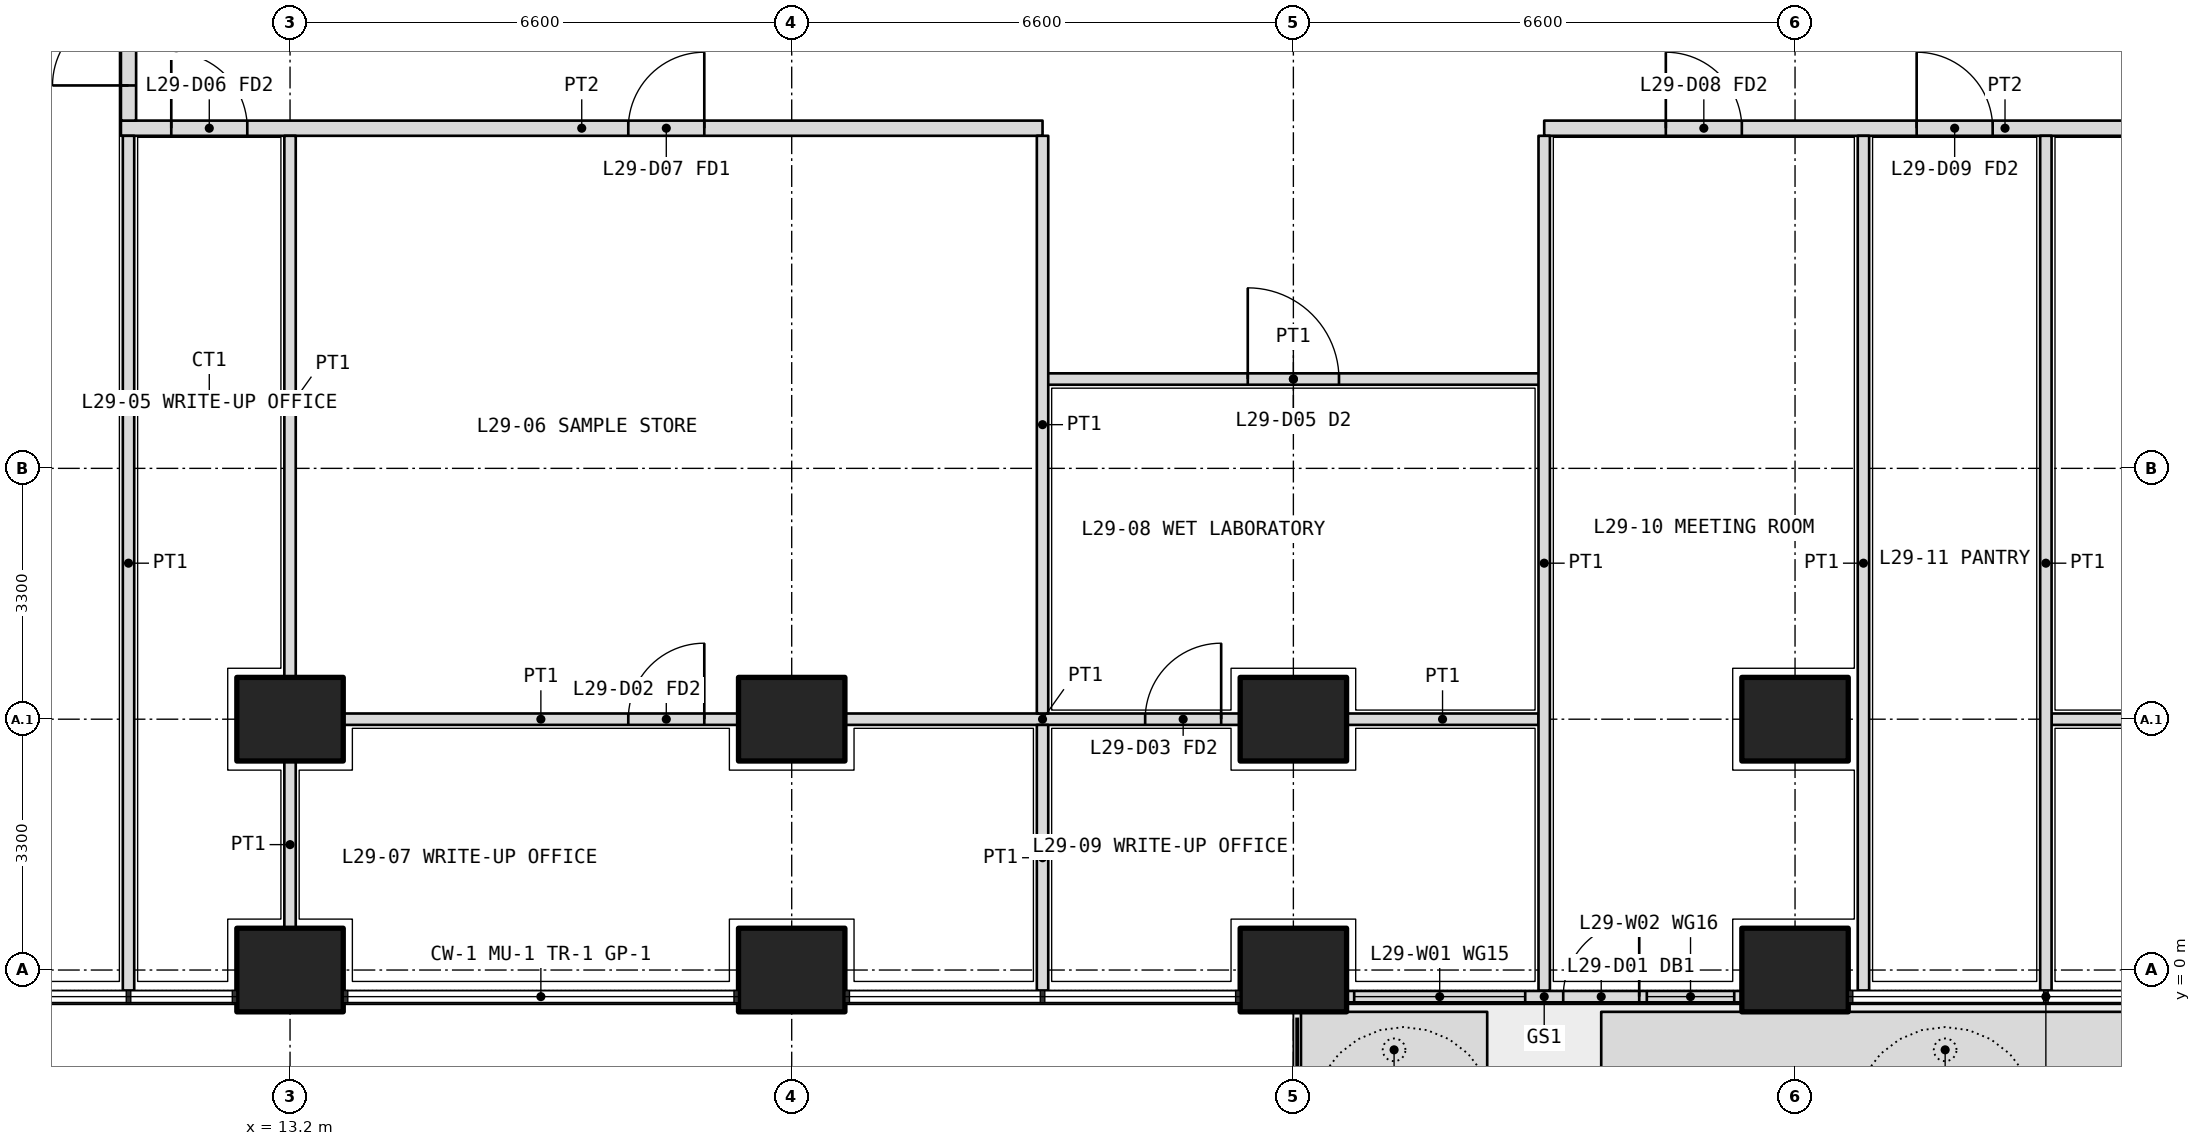
"""IFC4 building model, lengths in metres.
Left out: names, types, materials, properties, quantities, classifications, styles, units other than length and angle.
Written with IfcOpenShell. Run it as: python <this file> out.ifc"""

import sys

from ifc_helpers import new_model, si_unit, direction, frame, frame_2d, origin, origin_2d, place, context, subcontext, project, spatial, polyline, rectangle, outline, extrude, element, fill, save


model = new_model("IFC4")
c1 = context("Model", 3, precision=1e-05, world=origin(), true_north=direction((0.0, 1.0)))
c2 = subcontext(c1, "Body", "Model", "MODEL_VIEW")
j1 = project(units=[si_unit("LENGTHUNIT", "METRE"), si_unit("PLANEANGLEUNIT", "RADIAN")], contexts=[c1])
p1 = place(None, origin())
s1 = spatial("IfcSite", under=j1, at=p1, CompositionType="ELEMENT")
p2 = place(p1, origin())
s2 = spatial("IfcBuilding", under=s1, at=p2, CompositionType="ELEMENT")
p3 = place(p2, frame((0.0, 0.0, 128.4)))
s3 = spatial("IfcBuildingStorey", under=s2, at=p3, CompositionType="ELEMENT", Elevation=128.4)
for number, where, z_axis, x_axis in (
    (1, (13.2, 0.0, 0.0), (0.0, 0.0, 1.0), (1.0, 0.0, 0.0)),
    (2, (19.8, 0.0, 0.0), (0.0, 0.0, 1.0), (1.0, 0.0, 0.0)),
    (3, (26.4, 0.0, 0.0), (0.0, 0.0, 1.0), (1.0, 0.0, 0.0)),
    (4, (33.0, 0.0, 0.0), (0.0, 0.0, 1.0), (1.0, 0.0, 0.0)),
    (5, (13.2, 3.3, 0.0), (0.0, 0.0, 1.0), (1.0, 0.0, 0.0)),
    (6, (19.8, 3.3, 0.0), (0.0, 0.0, 1.0), (1.0, 0.0, 0.0)),
    (7, (26.4, 3.3, 0.0), (0.0, 0.0, 1.0), (1.0, 0.0, 0.0)),
    (8, (33.0, 3.3, 0.0), (0.0, 0.0, 1.0), (1.0, 0.0, 0.0)),
):
    element("IfcColumn", number, at=place(p3, frame(where, z_axis=z_axis, x_axis=x_axis)), inside=s3, PredefinedType="COLUMN", context=c2, shape_type="SweptSolid", body=[
        extrude(rectangle(XDim=1.4, YDim=1.1, at=origin_2d()), origin(), (0.0, 0.0, 1.0), 4.2),
    ])
p4 = place(p3, origin())
e9 = element("IfcWall", 9, at=p4, inside=s3, PredefinedType="USERDEFINED", context=c2, shape_type="SweptSolid", body=[
    extrude(outline(polyline([(26.5, -1.55), (28.95, -1.55), (28.95, -0.55), (26.5, -0.55), (26.5, -1.55)]), holes=[polyline([(26.65, -1.4), (28.8, -1.4), (28.8, -0.7), (26.65, -0.7), (26.65, -1.4)])]), origin(), (0.0, 0.0, 1.0), 1.05),
])
p5 = place(p3, origin())
e10 = element("IfcWall", 10, at=p5, inside=s3, PredefinedType="USERDEFINED", context=c2, shape_type="SweptSolid", body=[
    extrude(outline(polyline([(30.45, -1.55), (39.5, -1.55), (39.5, -0.55), (30.45, -0.55), (30.45, -1.55)]), holes=[polyline([(30.6, -1.4), (39.35, -1.4), (39.35, -0.7), (30.6, -0.7), (30.6, -1.4)])]), origin(), (0.0, 0.0, 1.0), 1.05),
])
p6 = place(p3, frame((27.1, -0.35, 0.0), z_axis=(0.0, 0.0, 1.0), x_axis=(1.0, 0.0, 0.0)))
e11 = element("IfcWall", 11, at=p6, inside=s3, PredefinedType="SOLIDWALL", context=c2, shape_type="SweptSolid", body=[
    extrude(rectangle(XDim=5.2, YDim=0.15, at=frame_2d((2.6, 0.0))), origin(), (0.0, 0.0, 1.0), 2.7),
])
p7 = place(p6, frame((2.85, 0.0, 0.0)))
e12 = element("IfcOpeningElement", 12, at=p7, cuts=e11, PredefinedType="OPENING", context=c2, shape_type="SweptSolid", body=[
    extrude(rectangle(XDim=1.0, YDim=2.4, at=frame_2d((0.5, 1.2))), frame((0.0, 0.085, 0.0), z_axis=(0.0, -1.0, 0.0), x_axis=(1.0, 0.0, 0.0)), (0.0, 0.0, 1.0), 0.17),
])
p8 = place(p6, frame((0.1, 0.0, 0.1)))
e13 = element("IfcOpeningElement", 13, at=p8, cuts=e11, PredefinedType="OPENING", context=c2, shape_type="SweptSolid", body=[
    extrude(rectangle(XDim=2.25, YDim=2.3, at=frame_2d((1.125, 1.15))), frame((0.0, 0.085, 0.0), z_axis=(0.0, -1.0, 0.0), x_axis=(1.0, 0.0, 0.0)), (0.0, 0.0, 1.0), 0.17),
])
p9 = place(p6, frame((3.95, 0.0, 0.1)))
e14 = element("IfcOpeningElement", 14, at=p9, cuts=e11, PredefinedType="OPENING", context=c2, shape_type="SweptSolid", body=[
    extrude(rectangle(XDim=1.15, YDim=2.3, at=frame_2d((0.575, 1.15))), frame((0.0, 0.085, 0.0), z_axis=(0.0, -1.0, 0.0), x_axis=(1.0, 0.0, 0.0)), (0.0, 0.0, 1.0), 0.17),
])
p10 = place(p3, frame((10.975, 11.075, 0.0), z_axis=(0.0, 0.0, 1.0), x_axis=(1.0, 0.0, 0.0)))
e15 = element("IfcWall", 15, at=p10, inside=s3, PredefinedType="PARTITIONING", context=c2, shape_type="SweptSolid", body=[
    extrude(rectangle(XDim=12.125, YDim=0.2, at=frame_2d((6.062, 0.0))), origin(), (0.0, 0.0, 1.0), 2.85),
])
p11 = place(p10, frame((0.663, 0.0, 0.0)))
e16 = element("IfcOpeningElement", 16, at=p11, cuts=e15, PredefinedType="OPENING", context=c2, shape_type="SweptSolid", body=[
    extrude(rectangle(XDim=1.0, YDim=2.1, at=frame_2d((0.5, 1.05))), frame((0.0, 0.11, 0.0), z_axis=(0.0, -1.0, 0.0), x_axis=(1.0, 0.0, 0.0)), (0.0, 0.0, 1.0), 0.22),
])
p12 = place(p10, frame((6.675, 0.0, 0.0)))
e17 = element("IfcOpeningElement", 17, at=p12, cuts=e15, PredefinedType="OPENING", context=c2, shape_type="SweptSolid", body=[
    extrude(rectangle(XDim=1.0, YDim=2.1, at=frame_2d((0.5, 1.05))), frame((0.0, 0.11, 0.0), z_axis=(0.0, -1.0, 0.0), x_axis=(1.0, 0.0, 0.0)), (0.0, 0.0, 1.0), 0.22),
])
p13 = place(p3, frame((29.7, 11.075, 0.0), z_axis=(0.0, 0.0, 1.0), x_axis=(1.0, 0.0, 0.0)))
e18 = element("IfcWall", 18, at=p13, inside=s3, PredefinedType="PARTITIONING", context=c2, shape_type="SweptSolid", body=[
    extrude(rectangle(XDim=12.125, YDim=0.2, at=frame_2d((6.062, 0.0))), origin(), (0.0, 0.0, 1.0), 2.85),
])
p14 = place(p13, frame((1.6, 0.0, 0.0)))
e19 = element("IfcOpeningElement", 19, at=p14, cuts=e18, PredefinedType="OPENING", context=c2, shape_type="SweptSolid", body=[
    extrude(rectangle(XDim=1.0, YDim=2.1, at=frame_2d((0.5, 1.05))), frame((0.0, 0.11, 0.0), z_axis=(0.0, -1.0, 0.0), x_axis=(1.0, 0.0, 0.0)), (0.0, 0.0, 1.0), 0.22),
])
p15 = place(p13, frame((4.9, 0.0, 0.0)))
e20 = element("IfcOpeningElement", 20, at=p15, cuts=e18, PredefinedType="OPENING", context=c2, shape_type="SweptSolid", body=[
    extrude(rectangle(XDim=1.0, YDim=2.1, at=frame_2d((0.5, 1.05))), frame((0.0, 0.11, 0.0), z_axis=(0.0, -1.0, 0.0), x_axis=(1.0, 0.0, 0.0)), (0.0, 0.0, 1.0), 0.22),
])
p16 = place(p13, frame((8.812, 0.0, 0.0)))
e21 = element("IfcOpeningElement", 21, at=p16, cuts=e18, PredefinedType="OPENING", context=c2, shape_type="SweptSolid", body=[
    extrude(rectangle(XDim=1.0, YDim=2.1, at=frame_2d((0.5, 1.05))), frame((0.0, 0.11, 0.0), z_axis=(0.0, -1.0, 0.0), x_axis=(1.0, 0.0, 0.0)), (0.0, 0.0, 1.0), 0.22),
])
p17 = place(p3, frame((11.075, 11.175, 0.0), z_axis=(0.0, 0.0, 1.0), x_axis=(0.0, 1.0, 0.0)))
e22 = element("IfcWall", 22, at=p17, inside=s3, PredefinedType="PARTITIONING", context=c2, shape_type="SweptSolid", body=[
    extrude(rectangle(XDim=27.625, YDim=0.2, at=frame_2d((13.812, 0.0))), origin(), (0.0, 0.0, 1.0), 2.85),
])
p18 = place(p17, frame((0.462, 0.0, 0.0)))
e23 = element("IfcOpeningElement", 23, at=p18, cuts=e22, PredefinedType="OPENING", context=c2, shape_type="SweptSolid", body=[
    extrude(rectangle(XDim=1.0, YDim=2.1, at=frame_2d((0.5, 1.05))), frame((0.0, 0.11, 0.0), z_axis=(0.0, -1.0, 0.0), x_axis=(1.0, 0.0, 0.0)), (0.0, 0.0, 1.0), 0.22),
])
p19 = place(p17, frame((2.575, 0.0, 0.0)))
e24 = element("IfcOpeningElement", 24, at=p19, cuts=e22, PredefinedType="OPENING", context=c2, shape_type="SweptSolid", body=[
    extrude(rectangle(XDim=1.0, YDim=2.1, at=frame_2d((0.5, 1.05))), frame((0.0, 0.11, 0.0), z_axis=(0.0, -1.0, 0.0), x_axis=(1.0, 0.0, 0.0)), (0.0, 0.0, 1.0), 0.22),
])
p20 = place(p17, frame((5.65, 0.0, 0.0)))
e25 = element("IfcOpeningElement", 25, at=p20, cuts=e22, PredefinedType="OPENING", context=c2, shape_type="SweptSolid", body=[
    extrude(rectangle(XDim=0.9, YDim=2.1, at=frame_2d((0.45, 1.05))), frame((0.0, 0.11, 0.0), z_axis=(0.0, -1.0, 0.0), x_axis=(1.0, 0.0, 0.0)), (0.0, 0.0, 1.0), 0.22),
])
p21 = place(p17, frame((9.5, 0.0, 0.0)))
e26 = element("IfcOpeningElement", 26, at=p21, cuts=e22, PredefinedType="OPENING", context=c2, shape_type="SweptSolid", body=[
    extrude(rectangle(XDim=0.9, YDim=2.1, at=frame_2d((0.45, 1.05))), frame((0.0, 0.11, 0.0), z_axis=(0.0, -1.0, 0.0), x_axis=(1.0, 0.0, 0.0)), (0.0, 0.0, 1.0), 0.22),
])
p22 = place(p17, frame((13.025, 0.0, 0.0)))
e27 = element("IfcOpeningElement", 27, at=p22, cuts=e22, PredefinedType="OPENING", context=c2, shape_type="SweptSolid", body=[
    extrude(rectangle(XDim=1.0, YDim=2.1, at=frame_2d((0.5, 1.05))), frame((0.0, 0.11, 0.0), z_axis=(0.0, -1.0, 0.0), x_axis=(1.0, 0.0, 0.0)), (0.0, 0.0, 1.0), 0.22),
])
p23 = place(p17, frame((19.675, 0.0, 0.0)))
e28 = element("IfcOpeningElement", 28, at=p23, cuts=e22, PredefinedType="OPENING", context=c2, shape_type="SweptSolid", body=[
    extrude(rectangle(XDim=1.0, YDim=2.1, at=frame_2d((0.5, 1.05))), frame((0.0, 0.11, 0.0), z_axis=(0.0, -1.0, 0.0), x_axis=(1.0, 0.0, 0.0)), (0.0, 0.0, 1.0), 0.22),
])
p24 = place(p17, frame((25.925, 0.0, 0.0)))
e29 = element("IfcOpeningElement", 29, at=p24, cuts=e22, PredefinedType="OPENING", context=c2, shape_type="SweptSolid", body=[
    extrude(rectangle(XDim=1.0, YDim=2.1, at=frame_2d((0.5, 1.05))), frame((0.0, 0.11, 0.0), z_axis=(0.0, -1.0, 0.0), x_axis=(1.0, 0.0, 0.0)), (0.0, 0.0, 1.0), 0.22),
])
p25 = place(p3, frame((11.075, -0.27, 0.0), z_axis=(0.0, 0.0, 1.0), x_axis=(0.0, 1.0, 0.0)))
e30 = element("IfcWall", 30, at=p25, inside=s3, PredefinedType="PARTITIONING", context=c2, shape_type="SweptSolid", body=[
    extrude(rectangle(XDim=11.245, YDim=0.15, at=frame_2d((5.623, 0.0))), origin(), (0.0, 0.0, 1.0), 2.7),
])
p26 = place(p3, frame((13.9, 3.3, 0.0), z_axis=(0.0, 0.0, 1.0), x_axis=(1.0, 0.0, 0.0)))
e31 = element("IfcWall", 31, at=p26, inside=s3, PredefinedType="PARTITIONING", context=c2, shape_type="SweptSolid", body=[
    extrude(rectangle(XDim=5.2, YDim=0.15, at=frame_2d((2.6, 0.0))), origin(), (0.0, 0.0, 1.0), 2.85),
])
p27 = place(p26, frame((3.75, 0.0, 0.0)))
e32 = element("IfcOpeningElement", 32, at=p27, cuts=e31, PredefinedType="OPENING", context=c2, shape_type="SweptSolid", body=[
    extrude(rectangle(XDim=1.0, YDim=2.1, at=frame_2d((0.5, 1.05))), frame((0.0, 0.085, 0.0), z_axis=(0.0, -1.0, 0.0), x_axis=(1.0, 0.0, 0.0)), (0.0, 0.0, 1.0), 0.17),
])
p28 = place(p3, frame((20.5, 3.3, 0.0), z_axis=(0.0, 0.0, 1.0), x_axis=(1.0, 0.0, 0.0)))
e33 = element("IfcWall", 33, at=p28, inside=s3, PredefinedType="PARTITIONING", context=c2, shape_type="SweptSolid", body=[
    extrude(rectangle(XDim=5.2, YDim=0.15, at=frame_2d((2.6, 0.0))), origin(), (0.0, 0.0, 1.0), 2.85),
])
p29 = place(p28, frame((3.95, 0.0, 0.0)))
e34 = element("IfcOpeningElement", 34, at=p29, cuts=e33, PredefinedType="OPENING", context=c2, shape_type="SweptSolid", body=[
    extrude(rectangle(XDim=1.0, YDim=2.1, at=frame_2d((0.5, 1.05))), frame((0.0, 0.085, 0.0), z_axis=(0.0, -1.0, 0.0), x_axis=(1.0, 0.0, 0.0)), (0.0, 0.0, 1.0), 0.17),
])
for number, where, z_axis, x_axis in (
    (35, (27.1, 3.3, 0.0), (0.0, 0.0, 1.0), (1.0, 0.0, 0.0)),
    (36, (36.375, 3.3, 0.0), (0.0, 0.0, 1.0), (1.0, 0.0, 0.0)),
):
    element("IfcWall", number, at=place(p3, frame(where, z_axis=z_axis, x_axis=x_axis)), inside=s3, PredefinedType="PARTITIONING", context=c2, shape_type="SweptSolid", body=[
        extrude(rectangle(XDim=2.525, YDim=0.15, at=frame_2d((1.262, 0.0))), origin(), (0.0, 0.0, 1.0), 2.85),
    ])
p30 = place(p3, frame((23.1, 7.775, 0.0), z_axis=(0.0, 0.0, 1.0), x_axis=(1.0, 0.0, 0.0)))
e37 = element("IfcWall", 37, at=p30, inside=s3, PredefinedType="PARTITIONING", context=c2, shape_type="SweptSolid", body=[
    extrude(rectangle(XDim=6.6, YDim=0.15, at=frame_2d((3.3, 0.0))), origin(), (0.0, 0.0, 1.0), 2.85),
])
p31 = place(p30, frame((2.7, 0.0, 0.0)))
e38 = element("IfcOpeningElement", 38, at=p31, cuts=e37, PredefinedType="OPENING", context=c2, shape_type="SweptSolid", body=[
    extrude(rectangle(XDim=1.2, YDim=2.1, at=frame_2d((0.6, 1.05))), frame((0.0, 0.085, 0.0), z_axis=(0.0, -1.0, 0.0), x_axis=(1.0, 0.0, 0.0)), (0.0, 0.0, 1.0), 0.17),
])
for number, where, z_axis, x_axis in (
    (39, (33.9, -0.27, 0.0), (0.0, 0.0, 1.0), (0.0, 1.0, 0.0)),
    (40, (36.3, -0.27, 0.0), (0.0, 0.0, 1.0), (0.0, 1.0, 0.0)),
):
    element("IfcWall", number, at=place(p3, frame(where, z_axis=z_axis, x_axis=x_axis)), inside=s3, PredefinedType="PARTITIONING", context=c2, shape_type="SweptSolid", body=[
        extrude(rectangle(XDim=11.245, YDim=0.15, at=frame_2d((5.623, 0.0))), origin(), (0.0, 0.0, 1.0), 2.7),
    ])
p32 = place(p3, frame((13.2, 0.55, 0.0), z_axis=(0.0, 0.0, 1.0), x_axis=(0.0, 1.0, 0.0)))
e41 = element("IfcWall", 41, at=p32, inside=s3, PredefinedType="PARTITIONING", context=c2, shape_type="SweptSolid", body=[
    extrude(rectangle(XDim=2.2, YDim=0.15, at=frame_2d((1.1, 0.0))), origin(), (0.0, 0.0, 1.0), 2.85),
])
p33 = place(p3, frame((13.2, 3.85, 0.0), z_axis=(0.0, 0.0, 1.0), x_axis=(0.0, 1.0, 0.0)))
e42 = element("IfcWall", 42, at=p33, inside=s3, PredefinedType="PARTITIONING", context=c2, shape_type="SweptSolid", body=[
    extrude(rectangle(XDim=7.125, YDim=0.15, at=frame_2d((3.562, 0.0))), origin(), (0.0, 0.0, 1.0), 2.85),
])
p34 = place(p3, frame((23.1, -0.27, 0.0), z_axis=(0.0, 0.0, 1.0), x_axis=(0.0, 1.0, 0.0)))
e43 = element("IfcWall", 43, at=p34, inside=s3, PredefinedType="PARTITIONING", context=c2, shape_type="SweptSolid", body=[
    extrude(rectangle(XDim=3.495, YDim=0.15, at=frame_2d((1.748, 0.0))), origin(), (0.0, 0.0, 1.0), 2.7),
])
p35 = place(p3, frame((23.1, 3.375, 0.0), z_axis=(0.0, 0.0, 1.0), x_axis=(0.0, 1.0, 0.0)))
e44 = element("IfcWall", 44, at=p35, inside=s3, PredefinedType="PARTITIONING", context=c2, shape_type="SweptSolid", body=[
    extrude(rectangle(XDim=7.6, YDim=0.15, at=frame_2d((3.8, 0.0))), origin(), (0.0, 0.0, 1.0), 3.9),
])
p36 = place(p3, frame((29.7, -0.27, 0.0), z_axis=(0.0, 0.0, 1.0), x_axis=(0.0, 1.0, 0.0)))
e45 = element("IfcWall", 45, at=p36, inside=s3, PredefinedType="PARTITIONING", context=c2, shape_type="SweptSolid", body=[
    extrude(rectangle(XDim=11.245, YDim=0.15, at=frame_2d((5.623, 0.0))), origin(), (0.0, 0.0, 1.0), 2.7),
])
p37 = place(p7, origin())
e46 = element("IfcDoor", 46, at=p37, inside=s3, OperationType="SINGLE_SWING_RIGHT", PredefinedType="DOOR", context=c2, shape_type="SweptSolid", body=[
    extrude(rectangle(XDim=1.0, YDim=2.4, at=frame_2d((0.5, 1.2))), frame((0.0, 0.025, 0.0), z_axis=(0.0, -1.0, 0.0), x_axis=(1.0, 0.0, 0.0)), (0.0, 0.0, 1.0), 0.05),
])
fill(e12, e46)
p38 = place(p8, origin())
e47 = element("IfcWindow", 47, at=p38, inside=s3, PartitioningType="SINGLE_PANEL", PredefinedType="WINDOW", context=c2, shape_type="SweptSolid", body=[
    extrude(rectangle(XDim=2.25, YDim=2.3, at=frame_2d((1.125, 1.15))), frame((0.0, 0.03, 0.0), z_axis=(0.0, -1.0, 0.0), x_axis=(1.0, 0.0, 0.0)), (0.0, 0.0, 1.0), 0.06),
])
fill(e13, e47)
p39 = place(p9, origin())
e48 = element("IfcWindow", 48, at=p39, inside=s3, PartitioningType="SINGLE_PANEL", PredefinedType="WINDOW", context=c2, shape_type="SweptSolid", body=[
    extrude(rectangle(XDim=1.15, YDim=2.3, at=frame_2d((0.575, 1.15))), frame((0.0, 0.03, 0.0), z_axis=(0.0, -1.0, 0.0), x_axis=(1.0, 0.0, 0.0)), (0.0, 0.0, 1.0), 0.06),
])
fill(e14, e48)
p40 = place(p11, origin())
e49 = element("IfcDoor", 49, at=p40, inside=s3, OperationType="SINGLE_SWING_LEFT", PredefinedType="DOOR", context=c2, shape_type="SweptSolid", body=[
    extrude(rectangle(XDim=1.0, YDim=2.1, at=frame_2d((0.5, 1.05))), frame((0.0, 0.025, 0.0), z_axis=(0.0, -1.0, 0.0), x_axis=(1.0, 0.0, 0.0)), (0.0, 0.0, 1.0), 0.05),
])
fill(e16, e49)
p41 = place(p12, origin())
e50 = element("IfcDoor", 50, at=p41, inside=s3, OperationType="SINGLE_SWING_RIGHT", PredefinedType="DOOR", context=c2, shape_type="SweptSolid", body=[
    extrude(rectangle(XDim=1.0, YDim=2.1, at=frame_2d((0.5, 1.05))), frame((0.0, 0.025, 0.0), z_axis=(0.0, -1.0, 0.0), x_axis=(1.0, 0.0, 0.0)), (0.0, 0.0, 1.0), 0.05),
])
fill(e17, e50)
p42 = place(p27, origin())
e51 = element("IfcDoor", 51, at=p42, inside=s3, OperationType="SINGLE_SWING_RIGHT", PredefinedType="DOOR", context=c2, shape_type="SweptSolid", body=[
    extrude(rectangle(XDim=1.0, YDim=2.1, at=frame_2d((0.5, 1.05))), frame((0.0, 0.025, 0.0), z_axis=(0.0, -1.0, 0.0), x_axis=(1.0, 0.0, 0.0)), (0.0, 0.0, 1.0), 0.05),
])
fill(e32, e51)
p43 = place(p31, origin())
e52 = element("IfcDoor", 52, at=p43, inside=s3, OperationType="DOUBLE_DOOR_SINGLE_SWING", PredefinedType="DOOR", context=c2, shape_type="SweptSolid", body=[
    extrude(rectangle(XDim=1.2, YDim=2.1, at=frame_2d((0.6, 1.05))), frame((0.0, 0.025, 0.0), z_axis=(0.0, -1.0, 0.0), x_axis=(1.0, 0.0, 0.0)), (0.0, 0.0, 1.0), 0.05),
])
fill(e38, e52)
p44 = place(p29, origin())
e53 = element("IfcDoor", 53, at=p44, inside=s3, OperationType="SINGLE_SWING_RIGHT", PredefinedType="DOOR", context=c2, shape_type="SweptSolid", body=[
    extrude(rectangle(XDim=1.0, YDim=2.1, at=frame_2d((0.5, 1.05))), frame((0.0, 0.025, 0.0), z_axis=(0.0, -1.0, 0.0), x_axis=(1.0, 0.0, 0.0)), (0.0, 0.0, 1.0), 0.05),
])
fill(e34, e53)
p45 = place(p14, origin())
e54 = element("IfcDoor", 54, at=p45, inside=s3, OperationType="SINGLE_SWING_LEFT", PredefinedType="DOOR", context=c2, shape_type="SweptSolid", body=[
    extrude(rectangle(XDim=1.0, YDim=2.1, at=frame_2d((0.5, 1.05))), frame((0.0, 0.025, 0.0), z_axis=(0.0, -1.0, 0.0), x_axis=(1.0, 0.0, 0.0)), (0.0, 0.0, 1.0), 0.05),
])
fill(e19, e54)
p46 = place(p15, origin())
e55 = element("IfcDoor", 55, at=p46, inside=s3, OperationType="SINGLE_SWING_LEFT", PredefinedType="DOOR", context=c2, shape_type="SweptSolid", body=[
    extrude(rectangle(XDim=1.0, YDim=2.1, at=frame_2d((0.5, 1.05))), frame((0.0, 0.025, 0.0), z_axis=(0.0, -1.0, 0.0), x_axis=(1.0, 0.0, 0.0)), (0.0, 0.0, 1.0), 0.05),
])
fill(e20, e55)
p47 = place(p18, origin())
e56 = element("IfcDoor", 56, at=p47, inside=s3, OperationType="SINGLE_SWING_LEFT", PredefinedType="DOOR", context=c2, shape_type="SweptSolid", body=[
    extrude(rectangle(XDim=1.0, YDim=2.1, at=frame_2d((0.5, 1.05))), frame((0.0, 0.025, 0.0), z_axis=(0.0, -1.0, 0.0), x_axis=(1.0, 0.0, 0.0)), (0.0, 0.0, 1.0), 0.05),
])
fill(e23, e56)
save(model, sys.argv[1])
